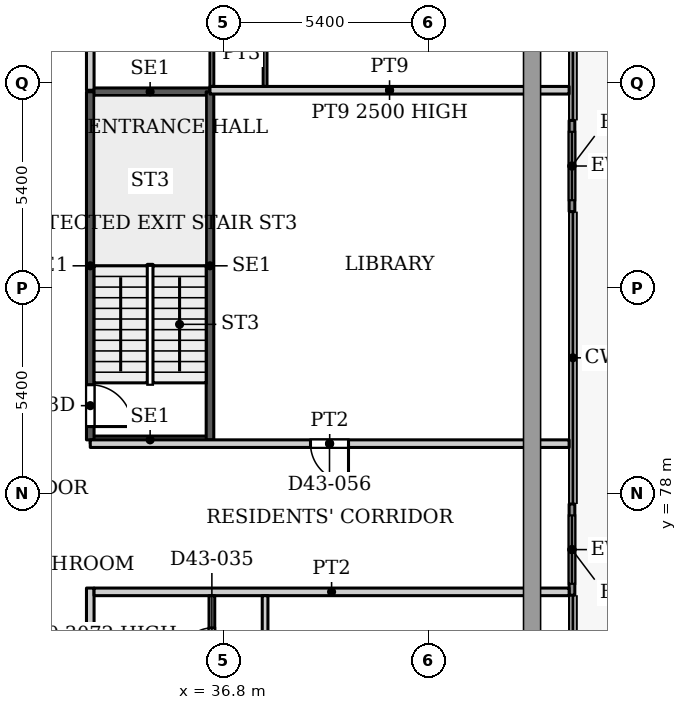
"""IFC4 building model, lengths in metres.
Left out: names, types, materials, properties, quantities, classifications, styles, units other than length and angle.
Written with IfcOpenShell. Run it as: python <this file> out.ifc"""

import sys

from ifc_helpers import new_model, si_unit, direction, frame, frame_2d, origin, place, context, subcontext, project, spatial, rectangle, extrude, source, transform, mapped, element, fill, save


model = new_model("IFC4")
c1 = context("Model", 3, precision=1e-05, world=origin(), true_north=direction((0.0, 1.0)))
c2 = subcontext(c1, "Body", "Model", "MODEL_VIEW")
j1 = project(units=[si_unit("LENGTHUNIT", "METRE"), si_unit("PLANEANGLEUNIT", "RADIAN")], contexts=[c1])
p1 = place(None, origin())
s1 = spatial("IfcSite", under=j1, at=p1, CompositionType="ELEMENT")
p2 = place(p1, origin())
s2 = spatial("IfcBuilding", under=s1, at=p2, CompositionType="ELEMENT")
p3 = place(p2, frame((0.0, 0.0, 183.8)))
s3 = spatial("IfcBuildingStorey", under=s2, at=p3, CompositionType="ELEMENT", Elevation=183.8)
p4 = place(p3, frame((45.975, 87.806, 0.0), z_axis=(0.0, 0.0, 1.0), x_axis=(0.0, -1.0, 0.0)))
e1 = element("IfcWall", 1, at=p4, inside=s3, PredefinedType="SOLIDWALL", context=c2, shape_type="SweptSolid", body=[
    extrude(rectangle(XDim=2.4, YDim=0.15, at=frame_2d((1.2, 0.0))), origin(), (0.0, 0.0, 1.0), 3.75),
])
p5 = place(p4, frame((0.3, 0.0, 0.0)))
e2 = element("IfcOpeningElement", 2, at=p5, cuts=e1, PredefinedType="OPENING", context=c2, shape_type="SweptSolid", body=[
    extrude(rectangle(XDim=1.8, YDim=2.4, at=frame_2d((0.9, 1.2))), frame((0.0, 0.085, 0.0), z_axis=(0.0, -1.0, 0.0), x_axis=(1.0, 0.0, 0.0)), (0.0, 0.0, 1.0), 0.17),
])
p6 = place(p3, frame((45.975, 77.712, 0.0), z_axis=(0.0, 0.0, 1.0), x_axis=(0.0, -1.0, 0.0)))
e3 = element("IfcWall", 3, at=p6, inside=s3, PredefinedType="SOLIDWALL", context=c2, shape_type="SweptSolid", body=[
    extrude(rectangle(XDim=2.4, YDim=0.15, at=frame_2d((1.2, 0.0))), origin(), (0.0, 0.0, 1.0), 3.75),
])
p7 = place(p6, frame((0.3, 0.0, 0.0)))
e4 = element("IfcOpeningElement", 4, at=p7, cuts=e3, PredefinedType="OPENING", context=c2, shape_type="SweptSolid", body=[
    extrude(rectangle(XDim=1.8, YDim=2.4, at=frame_2d((0.9, 1.2))), frame((0.0, 0.085, 0.0), z_axis=(0.0, -1.0, 0.0), x_axis=(1.0, 0.0, 0.0)), (0.0, 0.0, 1.0), 0.17),
])
for number, where, z_axis, x_axis in (
    (5, (33.3, 79.4, 0.0), (0.0, 0.0, 1.0), (1.0, 0.0, 0.0)),
    (6, (33.3, 88.56, 0.0), (0.0, 0.0, 1.0), (1.0, 0.0, 0.0)),
):
    element("IfcWall", number, at=place(p3, frame(where, z_axis=z_axis, x_axis=x_axis)), inside=s3, PredefinedType="SHEAR", context=c2, shape_type="SweptSolid", body=[
        extrude(rectangle(XDim=3.15, YDim=0.2, at=frame_2d((1.575, 0.0))), origin(), (0.0, 0.0, 1.0), 3.9),
    ])
p8 = place(p3, frame((33.3, 79.4, 0.0), z_axis=(0.0, 0.0, 1.0), x_axis=(0.0, 1.0, 0.0)))
e7 = element("IfcWall", 7, at=p8, inside=s3, PredefinedType="SHEAR", context=c2, shape_type="SweptSolid", body=[
    extrude(rectangle(XDim=9.16, YDim=0.2, at=frame_2d((4.58, 0.0))), origin(), (0.0, 0.0, 1.0), 3.9),
])
p9 = place(p8, frame((0.35, 0.0, 0.0)))
e8 = element("IfcOpeningElement", 8, at=p9, cuts=e7, PredefinedType="OPENING", context=c2, shape_type="SweptSolid", body=[
    extrude(rectangle(XDim=1.1, YDim=2.2, at=frame_2d((0.55, 1.1))), frame((0.0, 0.11, 0.0), z_axis=(0.0, -1.0, 0.0), x_axis=(1.0, 0.0, 0.0)), (0.0, 0.0, 1.0), 0.22),
])
p10 = place(p3, frame((36.45, 79.4, 0.0), z_axis=(0.0, 0.0, 1.0), x_axis=(0.0, 1.0, 0.0)))
e9 = element("IfcWall", 9, at=p10, inside=s3, PredefinedType="SHEAR", context=c2, shape_type="SweptSolid", body=[
    extrude(rectangle(XDim=9.16, YDim=0.2, at=frame_2d((4.58, 0.0))), origin(), (0.0, 0.0, 1.0), 3.9),
])
p11 = place(p3, frame((33.3, 57.9, 0.0), z_axis=(0.0, 0.0, 1.0), x_axis=(0.0, 1.0, 0.0)))
e10 = element("IfcWall", 10, at=p11, inside=s3, PredefinedType="PARTITIONING", context=c2, shape_type="SweptSolid", body=[
    extrude(rectangle(XDim=17.6, YDim=0.2, at=frame_2d((8.8, 0.0))), origin(), (0.0, 0.0, 1.0), 3.6),
])
p12 = place(p11, frame((8.9, 0.0, 0.0)))
e11 = element("IfcOpeningElement", 11, at=p12, cuts=e10, PredefinedType="OPENING", context=c2, shape_type="SweptSolid", body=[
    extrude(rectangle(XDim=1.0, YDim=2.1, at=frame_2d((0.5, 1.05))), frame((0.0, 0.11, 0.0), z_axis=(0.0, -1.0, 0.0), x_axis=(1.0, 0.0, 0.0)), (0.0, 0.0, 1.0), 0.22),
])
p13 = place(p3, frame((33.3, 79.3, 0.0), z_axis=(0.0, 0.0, 1.0), x_axis=(1.0, 0.0, 0.0)))
e12 = element("IfcWall", 12, at=p13, inside=s3, PredefinedType="PARTITIONING", context=c2, shape_type="SweptSolid", body=[
    extrude(rectangle(XDim=12.6, YDim=0.2, at=frame_2d((6.3, 0.0))), origin(), (0.0, 0.0, 1.0), 3.6),
])
p14 = place(p13, frame((5.795, 0.0, 0.0)))
e13 = element("IfcOpeningElement", 13, at=p14, cuts=e12, PredefinedType="OPENING", context=c2, shape_type="SweptSolid", body=[
    extrude(rectangle(XDim=1.0, YDim=2.1, at=frame_2d((0.5, 1.05))), frame((0.0, 0.11, 0.0), z_axis=(0.0, -1.0, 0.0), x_axis=(1.0, 0.0, 0.0)), (0.0, 0.0, 1.0), 0.22),
])
p15 = place(p3, frame((33.3, 88.6, 0.0), z_axis=(0.0, 0.0, 1.0), x_axis=(0.0, 1.0, 0.0)))
e14 = element("IfcWall", 14, at=p15, inside=s3, PredefinedType="PARTITIONING", context=c2, shape_type="SweptSolid", body=[
    extrude(rectangle(XDim=5.175, YDim=0.2, at=frame_2d((2.587, 0.0))), origin(), (0.0, 0.0, 1.0), 3.6),
])
p16 = place(p15, frame((3.7, 0.0, 0.0)))
e15 = element("IfcOpeningElement", 15, at=p16, cuts=e14, PredefinedType="OPENING", context=c2, shape_type="SweptSolid", body=[
    extrude(rectangle(XDim=1.0, YDim=2.1, at=frame_2d((0.5, 1.05))), frame((0.0, 0.11, 0.0), z_axis=(0.0, -1.0, 0.0), x_axis=(1.0, 0.0, 0.0)), (0.0, 0.0, 1.0), 0.22),
])
p17 = place(p3, frame((33.4, 75.4, 0.0), z_axis=(0.0, 0.0, 1.0), x_axis=(1.0, 0.0, 0.0)))
e16 = element("IfcWall", 16, at=p17, inside=s3, PredefinedType="PARTITIONING", context=c2, shape_type="SweptSolid", body=[
    extrude(rectangle(XDim=12.5, YDim=0.2, at=frame_2d((6.25, 0.0))), origin(), (0.0, 0.0, 1.0), 3.6),
])
p18 = place(p3, frame((36.45, 88.6, 0.0), z_axis=(0.0, 0.0, 1.0), x_axis=(1.0, 0.0, 0.0)))
e17 = element("IfcWall", 17, at=p18, inside=s3, PredefinedType="PARTITIONING", context=c2, shape_type="SweptSolid", body=[
    extrude(rectangle(XDim=9.45, YDim=0.2, at=frame_2d((4.725, 0.0))), origin(), (0.0, 0.0, 1.0), 2.5),
])
p19 = place(p3, frame((36.5, 68.75, 0.0), z_axis=(0.0, 0.0, 1.0), x_axis=(0.0, 1.0, 0.0)))
e18 = element("IfcWall", 18, at=p19, inside=s3, PredefinedType="PARTITIONING", context=c2, shape_type="SweptSolid", body=[
    extrude(rectangle(XDim=6.55, YDim=0.15, at=frame_2d((3.275, 0.0))), origin(), (0.0, 0.0, 1.0), 3.6),
])
p20 = place(p19, frame((4.9, 0.0, 0.0)))
e19 = element("IfcOpeningElement", 19, at=p20, cuts=e18, PredefinedType="OPENING", context=c2, shape_type="SweptSolid", body=[
    extrude(rectangle(XDim=0.8, YDim=2.1, at=frame_2d((0.4, 1.05))), frame((0.0, 0.085, 0.0), z_axis=(0.0, -1.0, 0.0), x_axis=(1.0, 0.0, 0.0)), (0.0, 0.0, 1.0), 0.17),
])
p21 = place(p19, frame((1.55, 0.0, 0.0)))
e20 = element("IfcOpeningElement", 20, at=p21, cuts=e18, PredefinedType="OPENING", context=c2, shape_type="SweptSolid", body=[
    extrude(rectangle(XDim=0.9, YDim=2.1, at=frame_2d((0.45, 1.05))), frame((0.0, 0.085, 0.0), z_axis=(0.0, -1.0, 0.0), x_axis=(1.0, 0.0, 0.0)), (0.0, 0.0, 1.0), 0.17),
])
p22 = place(p3, frame((36.5, 88.7, 0.0), z_axis=(0.0, 0.0, 1.0), x_axis=(0.0, 1.0, 0.0)))
e21 = element("IfcWall", 21, at=p22, inside=s3, PredefinedType="PARTITIONING", context=c2, shape_type="SweptSolid", body=[
    extrude(rectangle(XDim=3.25, YDim=0.1, at=frame_2d((1.625, 0.0))), origin(), (0.0, 0.0, 1.0), 3.6),
])
p23 = place(p22, frame((1.1, 0.0, 0.0)))
e22 = element("IfcOpeningElement", 22, at=p23, cuts=e21, PredefinedType="OPENING", context=c2, shape_type="SweptSolid", body=[
    extrude(rectangle(XDim=0.9, YDim=2.1, at=frame_2d((0.45, 1.05))), frame((0.0, 0.06, 0.0), z_axis=(0.0, -1.0, 0.0), x_axis=(1.0, 0.0, 0.0)), (0.0, 0.0, 1.0), 0.12),
])
p24 = place(p3, frame((37.9, 58.1, 0.0), z_axis=(0.0, 0.0, 1.0), x_axis=(0.0, 1.0, 0.0)))
e23 = element("IfcWall", 23, at=p24, inside=s3, PredefinedType="PARTITIONING", context=c2, shape_type="SweptSolid", body=[
    extrude(rectangle(XDim=17.2, YDim=0.15, at=frame_2d((8.6, 0.0))), origin(), (0.0, 0.0, 1.0), 3.6),
])
p25 = place(p24, frame((0.95, 0.0, 0.0)))
e24 = element("IfcOpeningElement", 24, at=p25, cuts=e23, PredefinedType="OPENING", context=c2, shape_type="SweptSolid", body=[
    extrude(rectangle(XDim=0.9, YDim=2.1, at=frame_2d((0.45, 1.05))), frame((0.0, 0.085, 0.0), z_axis=(0.0, -1.0, 0.0), x_axis=(1.0, 0.0, 0.0)), (0.0, 0.0, 1.0), 0.17),
])
p26 = place(p24, frame((15.2, 0.0, 0.0)))
e25 = element("IfcOpeningElement", 25, at=p26, cuts=e23, PredefinedType="OPENING", context=c2, shape_type="SweptSolid", body=[
    extrude(rectangle(XDim=0.9, YDim=2.1, at=frame_2d((0.45, 1.05))), frame((0.0, 0.085, 0.0), z_axis=(0.0, -1.0, 0.0), x_axis=(1.0, 0.0, 0.0)), (0.0, 0.0, 1.0), 0.17),
])
p27 = place(p24, frame((9.0, 0.0, 0.0)))
e26 = element("IfcOpeningElement", 26, at=p27, cuts=e23, PredefinedType="OPENING", context=c2, shape_type="SweptSolid", body=[
    extrude(rectangle(XDim=1.0, YDim=2.1, at=frame_2d((0.5, 1.05))), frame((0.0, 0.085, 0.0), z_axis=(0.0, -1.0, 0.0), x_axis=(1.0, 0.0, 0.0)), (0.0, 0.0, 1.0), 0.17),
])
p28 = place(p24, frame((12.2, 0.0, 0.0)))
e27 = element("IfcOpeningElement", 27, at=p28, cuts=e23, PredefinedType="OPENING", context=c2, shape_type="SweptSolid", body=[
    extrude(rectangle(XDim=0.9, YDim=2.1, at=frame_2d((0.45, 1.05))), frame((0.0, 0.085, 0.0), z_axis=(0.0, -1.0, 0.0), x_axis=(1.0, 0.0, 0.0)), (0.0, 0.0, 1.0), 0.17),
])
p29 = place(p24, frame((3.8, 0.0, 0.0)))
e28 = element("IfcOpeningElement", 28, at=p29, cuts=e23, PredefinedType="OPENING", context=c2, shape_type="SweptSolid", body=[
    extrude(rectangle(XDim=0.9, YDim=2.1, at=frame_2d((0.45, 1.05))), frame((0.0, 0.085, 0.0), z_axis=(0.0, -1.0, 0.0), x_axis=(1.0, 0.0, 0.0)), (0.0, 0.0, 1.0), 0.17),
])
p30 = place(p3, frame((37.9, 88.7, 0.0), z_axis=(0.0, 0.0, 1.0), x_axis=(0.0, 1.0, 0.0)))
e29 = element("IfcWall", 29, at=p30, inside=s3, PredefinedType="PARTITIONING", context=c2, shape_type="SweptSolid", body=[
    extrude(rectangle(XDim=9.2, YDim=0.1, at=frame_2d((4.6, 0.0))), origin(), (0.0, 0.0, 1.0), 3.6),
])
p31 = place(p30, frame((1.4, 0.0, 0.0)))
e30 = element("IfcOpeningElement", 30, at=p31, cuts=e29, PredefinedType="OPENING", context=c2, shape_type="SweptSolid", body=[
    extrude(rectangle(XDim=0.9, YDim=2.1, at=frame_2d((0.45, 1.05))), frame((0.0, 0.06, 0.0), z_axis=(0.0, -1.0, 0.0), x_axis=(1.0, 0.0, 0.0)), (0.0, 0.0, 1.0), 0.12),
])
p32 = place(p30, frame((6.0, 0.0, 0.0)))
e31 = element("IfcOpeningElement", 31, at=p32, cuts=e29, PredefinedType="OPENING", context=c2, shape_type="SweptSolid", body=[
    extrude(rectangle(XDim=1.0, YDim=2.1, at=frame_2d((0.5, 1.05))), frame((0.0, 0.06, 0.0), z_axis=(0.0, -1.0, 0.0), x_axis=(1.0, 0.0, 0.0)), (0.0, 0.0, 1.0), 0.12),
])
m1 = source(origin(), c2, "Body", "SweptSolid", [
    extrude(rectangle(XDim=1.8, YDim=2.4, at=frame_2d((0.9, 1.2))), frame((0.0, 0.025, 0.0), z_axis=(0.0, -1.0, 0.0), x_axis=(1.0, 0.0, 0.0)), (0.0, 0.0, 1.0), 0.05),
])
p33 = place(p5, origin())
e32 = element("IfcDoor", 32, at=p33, inside=s3, OperationType="SLIDING_TO_LEFT", PredefinedType="DOOR", context=c2, shape_type="MappedRepresentation", body=[
    mapped(m1, transform((0.0, 0.0, 0.0), x_axis=(1.0, 0.0, 0.0), y_axis=(0.0, 1.0, 0.0), z_axis=(0.0, 0.0, 1.0), scale=1.0)),
])
fill(e2, e32)
p34 = place(p7, origin())
e33 = element("IfcDoor", 33, at=p34, inside=s3, OperationType="SLIDING_TO_LEFT", PredefinedType="DOOR", context=c2, shape_type="MappedRepresentation", body=[
    mapped(m1, transform((0.0, 0.0, 0.0), x_axis=(1.0, 0.0, 0.0), y_axis=(0.0, 1.0, 0.0), z_axis=(0.0, 0.0, 1.0), scale=1.0)),
])
fill(e4, e33)
m2 = source(origin(), c2, "Body", "SweptSolid", [
    extrude(rectangle(XDim=1.1, YDim=2.2, at=frame_2d((0.55, 1.1))), frame((0.0, 0.025, 0.0), z_axis=(0.0, -1.0, 0.0), x_axis=(1.0, 0.0, 0.0)), (0.0, 0.0, 1.0), 0.05),
])
p35 = place(p9, origin())
e34 = element("IfcDoor", 34, at=p35, inside=s3, OperationType="SINGLE_SWING_RIGHT", PredefinedType="DOOR", context=c2, shape_type="MappedRepresentation", body=[
    mapped(m2, transform((0.0, 0.0, 0.0), x_axis=(1.0, 0.0, 0.0), y_axis=(0.0, 1.0, 0.0), z_axis=(0.0, 0.0, 1.0), scale=1.0)),
])
fill(e8, e34)
m3 = source(origin(), c2, "Body", "SweptSolid", [
    extrude(rectangle(XDim=0.8, YDim=2.1, at=frame_2d((0.4, 1.05))), frame((0.0, 0.025, 0.0), z_axis=(0.0, -1.0, 0.0), x_axis=(1.0, 0.0, 0.0)), (0.0, 0.0, 1.0), 0.05),
])
p36 = place(p20, origin())
e35 = element("IfcDoor", 35, at=p36, inside=s3, OperationType="SINGLE_SWING_LEFT", PredefinedType="DOOR", context=c2, shape_type="MappedRepresentation", body=[
    mapped(m3, transform((0.0, 0.0, 0.0), x_axis=(1.0, 0.0, 0.0), y_axis=(0.0, 1.0, 0.0), z_axis=(0.0, 0.0, 1.0), scale=1.0)),
])
fill(e19, e35)
m4 = source(origin(), c2, "Body", "SweptSolid", [
    extrude(rectangle(XDim=1.0, YDim=2.1, at=frame_2d((0.5, 1.05))), frame((0.0, 0.025, 0.0), z_axis=(0.0, -1.0, 0.0), x_axis=(1.0, 0.0, 0.0)), (0.0, 0.0, 1.0), 0.05),
])
p37 = place(p14, origin())
e36 = element("IfcDoor", 36, at=p37, inside=s3, OperationType="SINGLE_SWING_RIGHT", PredefinedType="DOOR", context=c2, shape_type="MappedRepresentation", body=[
    mapped(m4, transform((0.0, 0.0, 0.0), x_axis=(1.0, 0.0, 0.0), y_axis=(0.0, 1.0, 0.0), z_axis=(0.0, 0.0, 1.0), scale=1.0)),
])
fill(e13, e36)
save(model, sys.argv[1])
